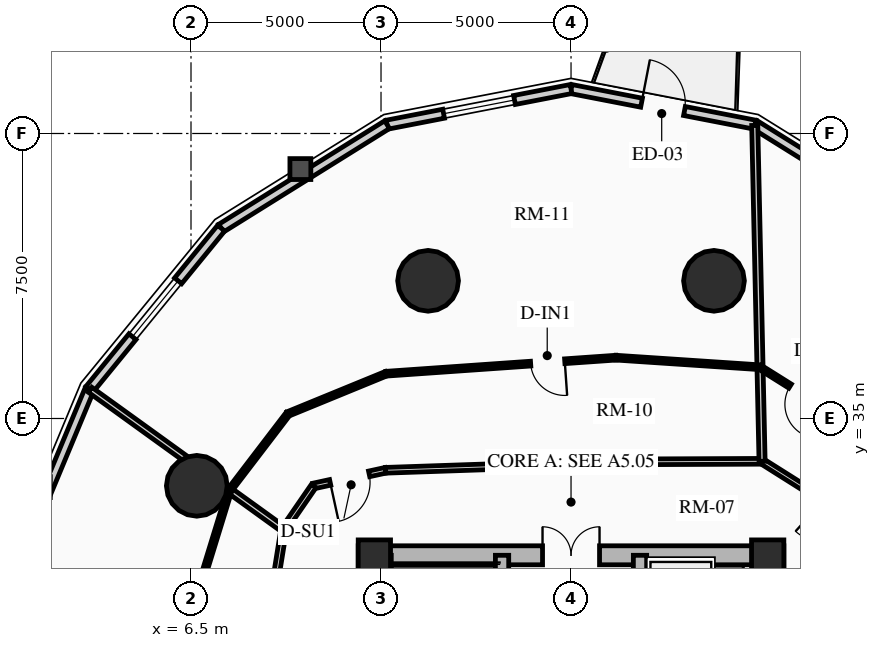
"""IFC4 building model, lengths in metres.
Left out: names, types, materials, properties, quantities, classifications, styles, units other than length and angle.
Written with IfcOpenShell. Run it as: python <this file> out.ifc"""

import sys

from ifc_helpers import new_model, si_unit, direction, frame, frame_2d, origin, origin_2d, place, context, subcontext, project, spatial, rectangle, circle, extrude, source, transform, mapped, element, fill, save


model = new_model("IFC4")
c1 = context("Model", 3, precision=1e-05, world=origin(), true_north=direction((0.0, 1.0)))
c2 = subcontext(c1, "Body", "Model", "MODEL_VIEW")
j1 = project(units=[si_unit("LENGTHUNIT", "METRE"), si_unit("PLANEANGLEUNIT", "RADIAN")], contexts=[c1])
p1 = place(None, origin())
s1 = spatial("IfcSite", under=j1, at=p1, CompositionType="ELEMENT")
p2 = place(p1, origin())
s2 = spatial("IfcBuilding", under=s1, at=p2, CompositionType="ELEMENT")
p3 = place(p2, frame((0.0, 0.0, 59.83)))
s3 = spatial("IfcBuildingStorey", under=s2, at=p3, CompositionType="ELEMENT", Elevation=59.83)
for number, where, z_axis, x_axis in (
    (1, (11.15, 17.35, 0.0), (0.0, 0.0, 1.0), (0.0, 1.0, 0.0)),
    (2, (21.85, 17.35, 0.0), (0.0, 0.0, 1.0), (0.0, 1.0, 0.0)),
):
    element("IfcWall", number, at=place(p3, frame(where, z_axis=z_axis, x_axis=x_axis)), inside=s3, PredefinedType="SHEAR", context=c2, shape_type="SweptSolid", body=[
        extrude(rectangle(XDim=14.3, YDim=0.5, at=frame_2d((7.15, 0.0))), origin(), (0.0, 0.0, 1.0), 2.91),
    ])
p4 = place(p3, frame((11.15, 31.4, 0.0), z_axis=(0.0, 0.0, 1.0), x_axis=(1.0, 0.0, 0.0)))
e3 = element("IfcWall", 3, at=p4, inside=s3, PredefinedType="SHEAR", context=c2, shape_type="SweptSolid", body=[
    extrude(rectangle(XDim=10.7, YDim=0.5, at=frame_2d((5.35, 0.0))), origin(), (0.0, 0.0, 1.0), 2.91),
])
m1 = source(origin(), c2, "Body", "SweptSolid", [
    extrude(rectangle(XDim=1.5, YDim=2.02, at=frame_2d((0.75, 1.01))), frame((0.0, 0.26, 0.0), z_axis=(0.0, -1.0, 0.0), x_axis=(1.0, 0.0, 0.0)), (0.0, 0.0, 1.0), 0.52),
])
p5 = place(p4, frame((4.6, 0.0, 0.0)))
e4 = element("IfcOpeningElement", 4, at=p5, cuts=e3, PredefinedType="OPENING", context=c2, shape_type="MappedRepresentation", body=[
    mapped(m1, transform((0.0, 0.0, 0.0), x_axis=(1.0, 0.0, 0.0), y_axis=(0.0, 1.0, 0.0), z_axis=(0.0, 0.0, 1.0), scale=1.0)),
])
p6 = place(p3, frame((14.685, 17.6, 0.0), z_axis=(0.0, 0.0, 1.0), x_axis=(0.0, 1.0, 0.0)))
e5 = element("IfcWall", 5, at=p6, inside=s3, PredefinedType="SHEAR", context=c2, shape_type="SweptSolid", body=[
    extrude(rectangle(XDim=13.8, YDim=0.35, at=frame_2d((6.9, 0.0))), origin(), (0.0, 0.0, 1.0), 2.91),
])
m2 = source(origin(), c2, "Body", "SweptSolid", [
    extrude(rectangle(XDim=1.1, YDim=2.015, at=frame_2d((0.55, 1.007))), frame((0.0, 0.185, 0.0), z_axis=(0.0, -1.0, 0.0), x_axis=(1.0, 0.0, 0.0)), (0.0, 0.0, 1.0), 0.37),
])
p7 = place(p6, frame((4.9, 0.0, 0.0)))
e6 = element("IfcOpeningElement", 6, at=p7, cuts=e5, PredefinedType="OPENING", context=c2, shape_type="MappedRepresentation", body=[
    mapped(m2, transform((0.0, 0.0, 0.0), x_axis=(1.0, 0.0, 0.0), y_axis=(0.0, 1.0, 0.0), z_axis=(0.0, 0.0, 1.0), scale=1.0)),
])
m3 = source(origin(), c2, "Body", "SweptSolid", [
    extrude(rectangle(XDim=1.15, YDim=2.02, at=frame_2d((0.575, 1.01))), frame((0.0, 0.185, 0.0), z_axis=(0.0, -1.0, 0.0), x_axis=(1.0, 0.0, 0.0)), (0.0, 0.0, 1.0), 0.37),
])
p8 = place(p6, frame((7.32, 0.0, 0.0)))
e7 = element("IfcOpeningElement", 7, at=p8, cuts=e5, PredefinedType="OPENING", context=c2, shape_type="MappedRepresentation", body=[
    mapped(m3, transform((0.0, 0.0, 0.0), x_axis=(1.0, 0.0, 0.0), y_axis=(0.0, 1.0, 0.0), z_axis=(0.0, 0.0, 1.0), scale=1.0)),
])
p9 = place(p3, frame((18.315, 17.6, 0.0), z_axis=(0.0, 0.0, 1.0), x_axis=(0.0, 1.0, 0.0)))
e8 = element("IfcWall", 8, at=p9, inside=s3, PredefinedType="SHEAR", context=c2, shape_type="SweptSolid", body=[
    extrude(rectangle(XDim=13.8, YDim=0.35, at=frame_2d((6.9, 0.0))), origin(), (0.0, 0.0, 1.0), 2.91),
])
p10 = place(p9, frame((10.025, 0.0, 0.0)))
e9 = element("IfcOpeningElement", 9, at=p10, cuts=e8, PredefinedType="OPENING", context=c2, shape_type="MappedRepresentation", body=[
    mapped(m2, transform((0.0, 0.0, 0.0), x_axis=(1.0, 0.0, 0.0), y_axis=(0.0, 1.0, 0.0), z_axis=(0.0, 0.0, 1.0), scale=1.0)),
])
p11 = place(p9, frame((12.025, 0.0, 0.0)))
e10 = element("IfcOpeningElement", 10, at=p11, cuts=e8, PredefinedType="OPENING", context=c2, shape_type="MappedRepresentation", body=[
    mapped(m2, transform((0.0, 0.0, 0.0), x_axis=(1.0, 0.0, 0.0), y_axis=(0.0, 1.0, 0.0), z_axis=(0.0, 0.0, 1.0), scale=1.0)),
])
p12 = place(p9, frame((5.33, 0.0, 0.0)))
e11 = element("IfcOpeningElement", 11, at=p12, cuts=e8, PredefinedType="OPENING", context=c2, shape_type="MappedRepresentation", body=[
    mapped(m3, transform((0.0, 0.0, 0.0), x_axis=(1.0, 0.0, 0.0), y_axis=(0.0, 1.0, 0.0), z_axis=(0.0, 0.0, 1.0), scale=1.0)),
])
p13 = place(p3, frame((11.595, 24.655, 0.0), z_axis=(0.0, 0.0, 1.0), x_axis=(0.0, 1.0, 0.0)))
e12 = element("IfcWall", 12, at=p13, inside=s3, PredefinedType="SHEAR", context=c2, shape_type="SweptSolid", body=[
    extrude(rectangle(XDim=6.745, YDim=0.35, at=frame_2d((3.373, 0.0))), origin(), (0.0, 0.0, 1.0), 2.91),
])
for number, where, z_axis, x_axis in (
    (13, (11.325, 31.38, 0.0), (0.0, 0.0, 1.0), (1.0, 0.0, 0.0)),
    (14, (21.675, 31.38, 0.0), (0.0, 0.0, 1.0), (1.0, 0.0, 0.0)),
):
    element("IfcColumn", number, at=place(p3, frame(where, z_axis=z_axis, x_axis=x_axis)), inside=s3, PredefinedType="COLUMN", context=c2, shape_type="SweptSolid", body=[
        extrude(rectangle(XDim=0.85, YDim=0.85, at=origin_2d()), origin(), (0.0, 0.0, 1.0), 2.91),
    ])
for number, where, z_axis, x_axis in (
    (15, (20.261, 38.623, 0.0), (0.0, 0.0, 1.0), (1.0, 0.0, 0.0)),
    (16, (12.739, 38.623, 0.0), (0.0, 0.0, 1.0), (1.0, 0.0, 0.0)),
    (17, (6.653, 33.229, 0.0), (0.0, 0.0, 1.0), (1.0, 0.0, 0.0)),
):
    element("IfcColumn", number, at=place(p3, frame(where, z_axis=z_axis, x_axis=x_axis)), inside=s3, PredefinedType="USERDEFINED", context=c2, shape_type="SweptSolid", body=[
        extrude(circle(Radius=0.8, at=origin_2d()), origin(), (0.0, 0.0, 1.0), 2.91),
    ])
p14 = place(p3, frame((21.34, 42.732, 0.0), z_axis=(0.0, 0.0, 1.0), x_axis=(0.848533613342, -0.529141481107, 0.0)))
e18 = element("IfcWall", 18, at=p14, inside=s3, PredefinedType="SOLIDWALL", context=c2, shape_type="SweptSolid", body=[
    extrude(rectangle(XDim=5.146, YDim=0.24, at=frame_2d((2.573, 0.0))), origin(), (0.0, 0.0, 1.0), 2.073),
])
p15 = place(p3, frame((16.5, 43.67, 0.0), z_axis=(0.0, 0.0, 1.0), x_axis=(0.981725274071, -0.190303668512, 0.0)))
e19 = element("IfcWall", 19, at=p15, inside=s3, PredefinedType="SOLIDWALL", context=c2, shape_type="SweptSolid", body=[
    extrude(rectangle(XDim=4.93, YDim=0.24, at=frame_2d((2.465, 0.0))), origin(), (0.0, 0.0, 1.0), 2.073),
])
m4 = source(origin(), c2, "Body", "SweptSolid", [
    extrude(rectangle(XDim=1.15, YDim=2.005, at=frame_2d((0.575, 1.002))), frame((0.0, 0.13, 0.0), z_axis=(0.0, -1.0, 0.0), x_axis=(1.0, 0.0, 0.0)), (0.0, 0.0, 1.0), 0.26),
])
p16 = place(p15, frame((1.89, 0.0, 0.0)))
e20 = element("IfcOpeningElement", 20, at=p16, cuts=e19, PredefinedType="OPENING", context=c2, shape_type="MappedRepresentation", body=[
    mapped(m4, transform((0.0, 0.0, 0.0), x_axis=(1.0, 0.0, 0.0), y_axis=(0.0, 1.0, 0.0), z_axis=(0.0, 0.0, 1.0), scale=1.0)),
])
p17 = place(p3, frame((11.66, 42.732, 0.0), z_axis=(0.0, 0.0, 1.0), x_axis=(0.981725274071, 0.190303668512, 0.0)))
e21 = element("IfcWall", 21, at=p17, inside=s3, PredefinedType="SOLIDWALL", context=c2, shape_type="SweptSolid", body=[
    extrude(rectangle(XDim=4.93, YDim=0.24, at=frame_2d((2.465, 0.0))), origin(), (0.0, 0.0, 1.0), 2.073),
])
m5 = source(origin(), c2, "Body", "SweptSolid", [
    extrude(rectangle(XDim=1.9, YDim=1.35, at=frame_2d((0.95, 0.675))), frame((0.0, 0.13, 0.0), z_axis=(0.0, -1.0, 0.0), x_axis=(1.0, 0.0, 0.0)), (0.0, 0.0, 1.0), 0.26),
])
p18 = place(p17, frame((1.515, 0.0, 0.65)))
e22 = element("IfcOpeningElement", 22, at=p18, cuts=e21, PredefinedType="OPENING", context=c2, shape_type="MappedRepresentation", body=[
    mapped(m5, transform((0.0, 0.0, 0.0), x_axis=(1.0, 0.0, 0.0), y_axis=(0.0, 1.0, 0.0), z_axis=(0.0, 0.0, 1.0), scale=1.0)),
])
p19 = place(p3, frame((7.293, 40.009, 0.0), z_axis=(0.0, 0.0, 1.0), x_axis=(0.848533613342, 0.529141481107, 0.0)))
e23 = element("IfcWall", 23, at=p19, inside=s3, PredefinedType="SOLIDWALL", context=c2, shape_type="SweptSolid", body=[
    extrude(rectangle(XDim=5.146, YDim=0.24, at=frame_2d((2.573, 0.0))), origin(), (0.0, 0.0, 1.0), 2.073),
])
p20 = place(p3, frame((3.828, 35.768, 0.0), z_axis=(0.0, 0.0, 1.0), x_axis=(0.632713287022, 0.77438614168, 0.0)))
e24 = element("IfcWall", 24, at=p20, inside=s3, PredefinedType="SOLIDWALL", context=c2, shape_type="SweptSolid", body=[
    extrude(rectangle(XDim=5.477, YDim=0.24, at=frame_2d((2.738, 0.0))), origin(), (0.0, 0.0, 1.0), 2.073),
])
p21 = place(p20, frame((1.788, 0.0, 0.65)))
e25 = element("IfcOpeningElement", 25, at=p21, cuts=e24, PredefinedType="OPENING", context=c2, shape_type="MappedRepresentation", body=[
    mapped(m5, transform((0.0, 0.0, 0.0), x_axis=(1.0, 0.0, 0.0), y_axis=(0.0, 1.0, 0.0), z_axis=(0.0, 0.0, 1.0), scale=1.0)),
])
p22 = place(p3, frame((1.604, 30.424, 0.0), z_axis=(0.0, 0.0, 1.0), x_axis=(0.384348836956, 0.923187939442, 0.0)))
e26 = element("IfcWall", 26, at=p22, inside=s3, PredefinedType="SOLIDWALL", context=c2, shape_type="SweptSolid", body=[
    extrude(rectangle(XDim=5.789, YDim=0.24, at=frame_2d((2.894, 0.0))), origin(), (0.0, 0.0, 1.0), 2.073),
])
p23 = place(p3, frame((22.877, 33.022, 0.0), z_axis=(0.0, 0.0, 1.0), x_axis=(-0.845895608855, 0.533348496689, 0.0)))
e27 = element("IfcWall", 27, at=p23, inside=s3, PredefinedType="PARTITIONING", context=c2, shape_type="SweptSolid", body=[
    extrude(rectangle(XDim=1.597, YDim=0.15, at=frame_2d((0.798, 0.0))), origin(), (0.0, 0.0, 1.0), 2.205),
])
p24 = place(p3, frame((21.527, 33.873, 0.0), z_axis=(0.0, 0.0, 1.0), x_axis=(-0.999991838845, -0.004040079574, 0.0)))
e28 = element("IfcWall", 28, at=p24, inside=s3, PredefinedType="PARTITIONING", context=c2, shape_type="SweptSolid", body=[
    extrude(rectangle(XDim=3.384, YDim=0.15, at=frame_2d((1.692, 0.0))), origin(), (0.0, 0.0, 1.0), 2.159),
])
p25 = place(p3, frame((18.143, 33.86, 0.0), z_axis=(0.0, 0.0, 1.0), x_axis=(-0.999419208319, -0.034077060363, 0.0)))
e29 = element("IfcWall", 29, at=p25, inside=s3, PredefinedType="PARTITIONING", context=c2, shape_type="SweptSolid", body=[
    extrude(rectangle(XDim=6.527, YDim=0.15, at=frame_2d((3.263, 0.0))), origin(), (0.0, 0.0, 1.0), 2.159),
])
p26 = place(p3, frame((11.62, 33.637, 0.0), z_axis=(0.0, 0.0, 1.0), x_axis=(-0.97702579435, -0.213121085711, 0.0)))
e30 = element("IfcWall", 30, at=p26, inside=s3, PredefinedType="PARTITIONING", context=c2, shape_type="SweptSolid", body=[
    extrude(rectangle(XDim=1.935, YDim=0.15, at=frame_2d((0.967, 0.0))), origin(), (0.0, 0.0, 1.0), 2.159),
])
m6 = source(origin(), c2, "Body", "SweptSolid", [
    extrude(rectangle(XDim=1.05, YDim=2.015, at=frame_2d((0.525, 1.007))), frame((0.0, 0.085, 0.0), z_axis=(0.0, -1.0, 0.0), x_axis=(1.0, 0.0, 0.0)), (0.0, 0.0, 1.0), 0.17),
])
p27 = place(p26, frame((0.442, 0.0, 0.0)))
e31 = element("IfcOpeningElement", 31, at=p27, cuts=e30, PredefinedType="OPENING", context=c2, shape_type="MappedRepresentation", body=[
    mapped(m6, transform((0.0, 0.0, 0.0), x_axis=(1.0, 0.0, 0.0), y_axis=(0.0, 1.0, 0.0), z_axis=(0.0, 0.0, 1.0), scale=1.0)),
])
p28 = place(p3, frame((9.729, 33.225, 0.0), z_axis=(0.0, 0.0, 1.0), x_axis=(-0.567183649484, -0.82359134755, 0.0)))
e32 = element("IfcWall", 32, at=p28, inside=s3, PredefinedType="PARTITIONING", context=c2, shape_type="SweptSolid", body=[
    extrude(rectangle(XDim=1.392, YDim=0.15, at=frame_2d((0.696, 0.0))), origin(), (0.0, 0.0, 1.0), 2.159),
])
p29 = place(p3, frame((8.94, 32.078, 0.0), z_axis=(0.0, 0.0, 1.0), x_axis=(-0.159148467753, -0.98725466077, 0.0)))
e33 = element("IfcWall", 33, at=p29, inside=s3, PredefinedType="PARTITIONING", context=c2, shape_type="SweptSolid", body=[
    extrude(rectangle(XDim=1.554, YDim=0.15, at=frame_2d((0.777, 0.0))), origin(), (0.0, 0.0, 1.0), 2.205),
])
p30 = place(p3, frame((21.527, 33.873, 0.0), z_axis=(0.0, 0.0, 1.0), x_axis=(-0.021814395676, 0.999762037758, 0.0)))
e34 = element("IfcWall", 34, at=p30, inside=s3, PredefinedType="PARTITIONING", context=c2, shape_type="SweptSolid", body=[
    extrude(rectangle(XDim=8.842, YDim=0.16, at=frame_2d((4.421, 0.0))), origin(), (0.0, 0.0, 1.0), 2.073),
])
p31 = place(p3, frame((8.94, 32.078, 0.0), z_axis=(0.0, 0.0, 1.0), x_axis=(-0.810854375189, 0.585247966453, 0.0)))
e35 = element("IfcWall", 35, at=p31, inside=s3, PredefinedType="PARTITIONING", context=c2, shape_type="SweptSolid", body=[
    extrude(rectangle(XDim=6.284, YDim=0.16, at=frame_2d((3.142, 0.0))), origin(), (0.0, 0.0, 1.0), 2.073),
])
p32 = place(p3, frame((23.666, 34.974, 0.0), z_axis=(0.0, 0.0, 1.0), x_axis=(-0.847319394731, 0.531083650014, 0.0)))
e36 = element("IfcWall", 36, at=p32, inside=s3, PredefinedType="PARTITIONING", context=c2, shape_type="SweptSolid", body=[
    extrude(rectangle(XDim=2.589, YDim=0.125, at=frame_2d((1.294, 0.0))), origin(), (0.0, 0.0, 1.0), 2.205),
])
m7 = source(origin(), c2, "Body", "SweptSolid", [
    extrude(rectangle(XDim=0.9, YDim=2.005, at=frame_2d((0.45, 1.002))), frame((0.0, 0.073, 0.0), z_axis=(0.0, -1.0, 0.0), x_axis=(1.0, 0.0, 0.0)), (0.0, 0.0, 1.0), 0.145),
])
p33 = place(p32, frame((0.754, 0.0, 0.0)))
e37 = element("IfcOpeningElement", 37, at=p33, cuts=e36, PredefinedType="OPENING", context=c2, shape_type="MappedRepresentation", body=[
    mapped(m7, transform((0.0, 0.0, 0.0), x_axis=(1.0, 0.0, 0.0), y_axis=(0.0, 1.0, 0.0), z_axis=(0.0, 0.0, 1.0), scale=1.0)),
])
p34 = place(p3, frame((21.473, 36.348, 0.0), z_axis=(0.0, 0.0, 1.0), x_axis=(-0.997789137643, 0.066459286803, 0.0)))
e38 = element("IfcWall", 38, at=p34, inside=s3, PredefinedType="PARTITIONING", context=c2, shape_type="SweptSolid", body=[
    extrude(rectangle(XDim=3.798, YDim=0.125, at=frame_2d((1.899, 0.0))), origin(), (0.0, 0.0, 1.0), 2.159),
])
p35 = place(p3, frame((17.683, 36.601, 0.0), z_axis=(0.0, 0.0, 1.0), x_axis=(-0.997569247495, -0.06968210998, 0.0)))
e39 = element("IfcWall", 39, at=p35, inside=s3, PredefinedType="PARTITIONING", context=c2, shape_type="SweptSolid", body=[
    extrude(rectangle(XDim=6.065, YDim=0.125, at=frame_2d((3.032, 0.0))), origin(), (0.0, 0.0, 1.0), 2.159),
])
p36 = place(p35, frame((1.351, 0.0, 0.0)))
e40 = element("IfcOpeningElement", 40, at=p36, cuts=e39, PredefinedType="OPENING", context=c2, shape_type="MappedRepresentation", body=[
    mapped(m7, transform((0.0, 0.0, 0.0), x_axis=(1.0, 0.0, 0.0), y_axis=(0.0, 1.0, 0.0), z_axis=(0.0, 0.0, 1.0), scale=1.0)),
])
p37 = place(p3, frame((11.633, 36.178, 0.0), z_axis=(0.0, 0.0, 1.0), x_axis=(-0.92528752303, -0.379266396779, 0.0)))
e41 = element("IfcWall", 41, at=p37, inside=s3, PredefinedType="PARTITIONING", context=c2, shape_type="SweptSolid", body=[
    extrude(rectangle(XDim=2.791, YDim=0.125, at=frame_2d((1.395, 0.0))), origin(), (0.0, 0.0, 1.0), 2.205),
])
p38 = place(p3, frame((9.051, 35.12, 0.0), z_axis=(0.0, 0.0, 1.0), x_axis=(-0.607256827378, -0.79450559822, 0.0)))
e42 = element("IfcWall", 42, at=p38, inside=s3, PredefinedType="PARTITIONING", context=c2, shape_type="SweptSolid", body=[
    extrude(rectangle(XDim=2.532, YDim=0.125, at=frame_2d((1.266, 0.0))), origin(), (0.0, 0.0, 1.0), 2.073),
])
p39 = place(p3, frame((7.513, 33.108, 0.0), z_axis=(0.0, 0.0, 1.0), x_axis=(-0.294167851511, -0.955753773279, 0.0)))
e43 = element("IfcWall", 43, at=p39, inside=s3, PredefinedType="PARTITIONING", context=c2, shape_type="SweptSolid", body=[
    extrude(rectangle(XDim=2.72, YDim=0.125, at=frame_2d((1.36, 0.0))), origin(), (0.0, 0.0, 1.0), 2.159),
])
m8 = source(origin(), c2, "Body", "SweptSolid", [
    extrude(rectangle(XDim=1.15, YDim=2.005, at=frame_2d((0.575, 1.002))), frame((0.0, 0.025, 0.0), z_axis=(0.0, -1.0, 0.0), x_axis=(1.0, 0.0, 0.0)), (0.0, 0.0, 1.0), 0.05),
])
p40 = place(p16, origin())
e44 = element("IfcDoor", 44, at=p40, inside=s3, OperationType="SINGLE_SWING_LEFT", PredefinedType="DOOR", context=c2, shape_type="MappedRepresentation", body=[
    mapped(m8, transform((0.0, 0.0, 0.0), x_axis=(1.0, 0.0, 0.0), y_axis=(0.0, 1.0, 0.0), z_axis=(0.0, 0.0, 1.0), scale=1.0)),
])
fill(e20, e44)
m9 = source(origin(), c2, "Body", "SweptSolid", [
    extrude(rectangle(XDim=1.9, YDim=1.35, at=frame_2d((0.95, 0.675))), frame((0.0, 0.03, 0.0), z_axis=(0.0, -1.0, 0.0), x_axis=(1.0, 0.0, 0.0)), (0.0, 0.0, 1.0), 0.06),
])
p41 = place(p18, origin())
e45 = element("IfcWindow", 45, at=p41, inside=s3, PartitioningType="DOUBLE_PANEL_VERTICAL", PredefinedType="WINDOW", context=c2, shape_type="MappedRepresentation", body=[
    mapped(m9, transform((0.0, 0.0, 0.0), x_axis=(1.0, 0.0, 0.0), y_axis=(0.0, 1.0, 0.0), z_axis=(0.0, 0.0, 1.0), scale=1.0)),
])
fill(e22, e45)
p42 = place(p21, origin())
e46 = element("IfcWindow", 46, at=p42, inside=s3, PartitioningType="DOUBLE_PANEL_VERTICAL", PredefinedType="WINDOW", context=c2, shape_type="MappedRepresentation", body=[
    mapped(m9, transform((0.0, 0.0, 0.0), x_axis=(1.0, 0.0, 0.0), y_axis=(0.0, 1.0, 0.0), z_axis=(0.0, 0.0, 1.0), scale=1.0)),
])
fill(e25, e46)
m10 = source(origin(), c2, "Body", "SweptSolid", [
    extrude(rectangle(XDim=1.5, YDim=2.02, at=frame_2d((0.75, 1.01))), frame((0.0, 0.025, 0.0), z_axis=(0.0, -1.0, 0.0), x_axis=(1.0, 0.0, 0.0)), (0.0, 0.0, 1.0), 0.05),
])
p43 = place(p5, origin())
e47 = element("IfcDoor", 47, at=p43, inside=s3, OperationType="DOUBLE_DOOR_SINGLE_SWING", PredefinedType="DOOR", context=c2, shape_type="MappedRepresentation", body=[
    mapped(m10, transform((0.0, 0.0, 0.0), x_axis=(1.0, 0.0, 0.0), y_axis=(0.0, 1.0, 0.0), z_axis=(0.0, 0.0, 1.0), scale=1.0)),
])
fill(e4, e47)
m11 = source(origin(), c2, "Body", "SweptSolid", [
    extrude(rectangle(XDim=0.9, YDim=2.005, at=frame_2d((0.45, 1.002))), frame((0.0, 0.025, 0.0), z_axis=(0.0, -1.0, 0.0), x_axis=(1.0, 0.0, 0.0)), (0.0, 0.0, 1.0), 0.05),
])
p44 = place(p33, origin())
e48 = element("IfcDoor", 48, at=p44, inside=s3, OperationType="SINGLE_SWING_LEFT", PredefinedType="DOOR", context=c2, shape_type="MappedRepresentation", body=[
    mapped(m11, transform((0.0, 0.0, 0.0), x_axis=(1.0, 0.0, 0.0), y_axis=(0.0, 1.0, 0.0), z_axis=(0.0, 0.0, 1.0), scale=1.0)),
])
fill(e37, e48)
m12 = source(origin(), c2, "Body", "SweptSolid", [
    extrude(rectangle(XDim=1.05, YDim=2.015, at=frame_2d((0.525, 1.007))), frame((0.0, 0.025, 0.0), z_axis=(0.0, -1.0, 0.0), x_axis=(1.0, 0.0, 0.0)), (0.0, 0.0, 1.0), 0.05),
])
p45 = place(p27, origin())
e49 = element("IfcDoor", 49, at=p45, inside=s3, OperationType="SINGLE_SWING_RIGHT", PredefinedType="DOOR", context=c2, shape_type="MappedRepresentation", body=[
    mapped(m12, transform((0.0, 0.0, 0.0), x_axis=(1.0, 0.0, 0.0), y_axis=(0.0, 1.0, 0.0), z_axis=(0.0, 0.0, 1.0), scale=1.0)),
])
fill(e31, e49)
p46 = place(p36, origin())
e50 = element("IfcDoor", 50, at=p46, inside=s3, OperationType="SINGLE_SWING_LEFT", PredefinedType="DOOR", context=c2, shape_type="MappedRepresentation", body=[
    mapped(m11, transform((0.0, 0.0, 0.0), x_axis=(1.0, 0.0, 0.0), y_axis=(0.0, 1.0, 0.0), z_axis=(0.0, 0.0, 1.0), scale=1.0)),
])
fill(e40, e50)
save(model, sys.argv[1])
